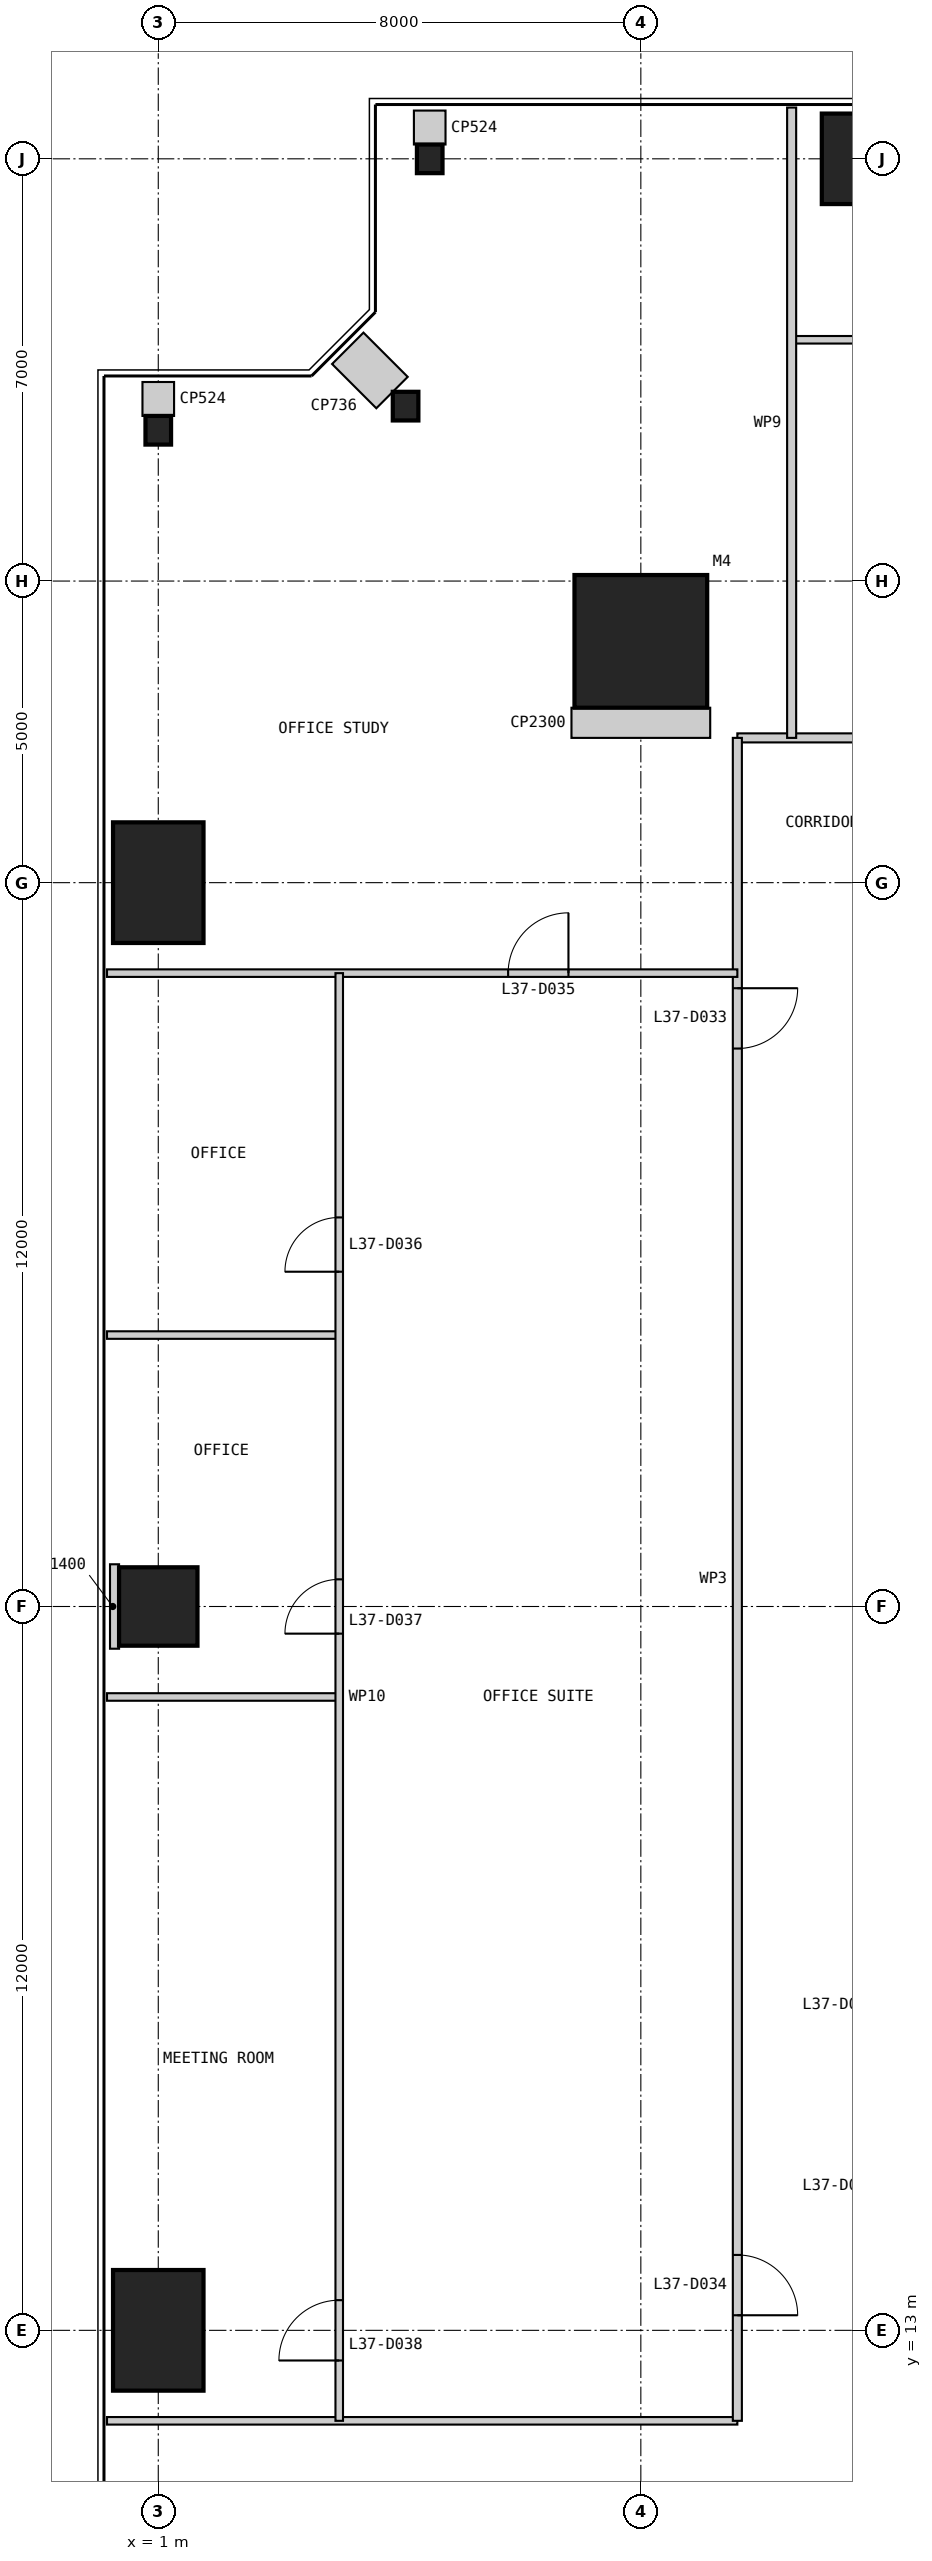
"""IFC4 building model, lengths in metres.
Left out: names, types, materials, properties, quantities, classifications, styles, units other than length and angle.
Written with IfcOpenShell. Run it as: python <this file> out.ifc"""

import sys

from ifc_helpers import new_model, si_unit, direction, frame, frame_2d, origin, origin_2d, place, context, subcontext, project, spatial, rectangle, i_section, extrude, element, fill, save


model = new_model("IFC4")
c1 = context("Model", 3, precision=1e-05, world=origin(), true_north=direction((0.0, 1.0)))
c2 = subcontext(c1, "Body", "Model", "MODEL_VIEW")
j1 = project(units=[si_unit("LENGTHUNIT", "METRE"), si_unit("PLANEANGLEUNIT", "RADIAN")], contexts=[c1])
p1 = place(None, origin())
s1 = spatial("IfcSite", under=j1, at=p1, CompositionType="ELEMENT")
p2 = place(p1, origin())
s2 = spatial("IfcBuilding", under=s1, at=p2, CompositionType="ELEMENT")
p3 = place(p2, frame((0.0, 0.0, 158.4)))
s3 = spatial("IfcBuildingStorey", under=s2, at=p3, CompositionType="ELEMENT", Elevation=158.4)
p4 = place(p3, frame((9.0, 41.0, 0.0), z_axis=(0.0, 0.0, 1.0), x_axis=(1.0, 0.0, 0.0)))
e1 = element("IfcColumn", 1, at=p4, inside=s3, PredefinedType="COLUMN", context=c2, shape_type="SweptSolid", body=[
    extrude(rectangle(XDim=2.2, YDim=2.2, at=origin_2d()), origin(), (0.0, 0.0, 1.0), 4.0),
])
p5 = place(p3, frame((13.0, 49.0, 0.0), z_axis=(0.0, 0.0, 1.0), x_axis=(1.0, 0.0, 0.0)))
e2 = element("IfcColumn", 2, at=p5, inside=s3, PredefinedType="COLUMN", context=c2, shape_type="SweptSolid", body=[
    extrude(rectangle(XDim=2.0, YDim=1.5, at=origin_2d()), origin(), (0.0, 0.0, 1.0), 4.0),
])
for number, where, z_axis, x_axis in (
    (3, (5.5, 49.0, 0.0), (0.0, 0.0, 1.0), (1.0, 0.0, 0.0)),
    (4, (5.1, 44.9, 0.0), (0.0, 0.0, 1.0), (1.0, 0.0, 0.0)),
    (5, (1.0, 44.5, 0.0), (0.0, 0.0, 1.0), (1.0, 0.0, 0.0)),
):
    element("IfcColumn", number, at=place(p3, frame(where, z_axis=z_axis, x_axis=x_axis)), inside=s3, PredefinedType="COLUMN", context=c2, shape_type="SweptSolid", body=[
        extrude(i_section(OverallWidth=0.424, OverallDepth=0.475, WebThickness=0.048, FlangeThickness=0.077, at=origin_2d()), origin(), (0.0, 0.0, 1.0), 4.0),
    ])
p6 = place(p3, frame((1.0, 37.0, 0.0), z_axis=(0.0, 0.0, 1.0), x_axis=(1.0, 0.0, 0.0)))
e6 = element("IfcColumn", 6, at=p6, inside=s3, PredefinedType="COLUMN", context=c2, shape_type="SweptSolid", body=[
    extrude(rectangle(XDim=1.5, YDim=2.0, at=origin_2d()), origin(), (0.0, 0.0, 1.0), 4.0),
])
p7 = place(p3, frame((1.0, 25.0, 0.0), z_axis=(0.0, 0.0, 1.0), x_axis=(1.0, 0.0, 0.0)))
e7 = element("IfcColumn", 7, at=p7, inside=s3, PredefinedType="COLUMN", context=c2, shape_type="SweptSolid", body=[
    extrude(rectangle(XDim=1.3, YDim=1.3, at=origin_2d()), origin(), (0.0, 0.0, 1.0), 4.0),
])
p8 = place(p3, frame((1.0, 13.0, 0.0), z_axis=(0.0, 0.0, 1.0), x_axis=(1.0, 0.0, 0.0)))
e8 = element("IfcColumn", 8, at=p8, inside=s3, PredefinedType="COLUMN", context=c2, shape_type="SweptSolid", body=[
    extrude(rectangle(XDim=1.5, YDim=2.0, at=origin_2d()), origin(), (0.0, 0.0, 1.0), 4.0),
])
p9 = place(p3, frame((0.15, 11.5, 0.0), z_axis=(0.0, 0.0, 1.0), x_axis=(1.0, 0.0, 0.0)))
e9 = element("IfcWall", 9, at=p9, inside=s3, PredefinedType="PARTITIONING", context=c2, shape_type="SweptSolid", body=[
    extrude(rectangle(XDim=10.45, YDim=0.125, at=frame_2d((5.225, 0.0))), origin(), (0.0, 0.0, 1.0), 3.8),
])
p10 = place(p3, frame((39.4, 39.4, 0.0), z_axis=(0.0, 0.0, 1.0), x_axis=(-1.0, 0.0, 0.0)))
e10 = element("IfcWall", 10, at=p10, inside=s3, PredefinedType="PARTITIONING", context=c2, shape_type="SweptSolid", body=[
    extrude(rectangle(XDim=28.8, YDim=0.15, at=frame_2d((14.4, 0.0))), origin(), (0.0, 0.0, 1.0), 3.8),
])
p11 = place(p10, frame((4.15, 0.0, 0.0)))
e11 = element("IfcOpeningElement", 11, at=p11, cuts=e10, PredefinedType="OPENING", context=c2, shape_type="SweptSolid", body=[
    extrude(rectangle(XDim=1.0, YDim=2.2, at=frame_2d((0.5, 1.1))), frame((0.0, 0.085, 0.0), z_axis=(0.0, -1.0, 0.0), x_axis=(1.0, 0.0, 0.0)), (0.0, 0.0, 1.0), 0.17),
])
p12 = place(p10, frame((23.65, 0.0, 0.0)))
e12 = element("IfcOpeningElement", 12, at=p12, cuts=e10, PredefinedType="OPENING", context=c2, shape_type="SweptSolid", body=[
    extrude(rectangle(XDim=1.0, YDim=2.2, at=frame_2d((0.5, 1.1))), frame((0.0, 0.085, 0.0), z_axis=(0.0, -1.0, 0.0), x_axis=(1.0, 0.0, 0.0)), (0.0, 0.0, 1.0), 0.17),
])
p13 = place(p10, frame((1.15, 0.0, 0.0)))
e13 = element("IfcOpeningElement", 13, at=p13, cuts=e10, PredefinedType="OPENING", context=c2, shape_type="SweptSolid", body=[
    extrude(rectangle(XDim=1.0, YDim=2.2, at=frame_2d((0.5, 1.1))), frame((0.0, 0.085, 0.0), z_axis=(0.0, -1.0, 0.0), x_axis=(1.0, 0.0, 0.0)), (0.0, 0.0, 1.0), 0.17),
])
p14 = place(p3, frame((17.5, 46.0, 0.0), z_axis=(0.0, 0.0, 1.0), x_axis=(-1.0, 0.0, 0.0)))
e14 = element("IfcWall", 14, at=p14, inside=s3, PredefinedType="PARTITIONING", context=c2, shape_type="SweptSolid", body=[
    extrude(rectangle(XDim=6.0, YDim=0.125, at=frame_2d((3.0, 0.0))), origin(), (0.0, 0.0, 1.0), 3.8),
])
p15 = place(p3, frame((10.6, 39.4, 0.0), z_axis=(0.0, 0.0, 1.0), x_axis=(0.0, -1.0, 0.0)))
e15 = element("IfcWall", 15, at=p15, inside=s3, PredefinedType="PARTITIONING", context=c2, shape_type="SweptSolid", body=[
    extrude(rectangle(XDim=27.9, YDim=0.15, at=frame_2d((13.95, 0.0))), origin(), (0.0, 0.0, 1.0), 3.8),
])
p16 = place(p15, frame((4.15, 0.0, 0.0)))
e16 = element("IfcOpeningElement", 16, at=p16, cuts=e15, PredefinedType="OPENING", context=c2, shape_type="SweptSolid", body=[
    extrude(rectangle(XDim=1.0, YDim=2.2, at=frame_2d((0.5, 1.1))), frame((0.0, 0.085, 0.0), z_axis=(0.0, -1.0, 0.0), x_axis=(1.0, 0.0, 0.0)), (0.0, 0.0, 1.0), 0.17),
])
p17 = place(p15, frame((25.15, 0.0, 0.0)))
e17 = element("IfcOpeningElement", 17, at=p17, cuts=e15, PredefinedType="OPENING", context=c2, shape_type="SweptSolid", body=[
    extrude(rectangle(XDim=1.0, YDim=2.2, at=frame_2d((0.5, 1.1))), frame((0.0, 0.085, 0.0), z_axis=(0.0, -1.0, 0.0), x_axis=(1.0, 0.0, 0.0)), (0.0, 0.0, 1.0), 0.17),
])
p18 = place(p3, frame((11.5, 49.85, 0.0), z_axis=(0.0, 0.0, 1.0), x_axis=(0.0, -1.0, 0.0)))
e18 = element("IfcWall", 18, at=p18, inside=s3, PredefinedType="PARTITIONING", context=c2, shape_type="SweptSolid", body=[
    extrude(rectangle(XDim=10.45, YDim=0.15, at=frame_2d((5.225, 0.0))), origin(), (0.0, 0.0, 1.0), 3.8),
])
p19 = place(p3, frame((0.15, 35.5, 0.0), z_axis=(0.0, 0.0, 1.0), x_axis=(1.0, 0.0, 0.0)))
e19 = element("IfcWall", 19, at=p19, inside=s3, PredefinedType="PARTITIONING", context=c2, shape_type="SweptSolid", body=[
    extrude(rectangle(XDim=10.45, YDim=0.125, at=frame_2d((5.225, 0.0))), origin(), (0.0, 0.0, 1.0), 3.8),
])
p20 = place(p19, frame((6.65, 0.0, 0.0)))
e20 = element("IfcOpeningElement", 20, at=p20, cuts=e19, PredefinedType="OPENING", context=c2, shape_type="SweptSolid", body=[
    extrude(rectangle(XDim=1.0, YDim=2.2, at=frame_2d((0.5, 1.1))), frame((0.0, 0.073, 0.0), z_axis=(0.0, -1.0, 0.0), x_axis=(1.0, 0.0, 0.0)), (0.0, 0.0, 1.0), 0.145),
])
for number, where, z_axis, x_axis in (
    (21, (0.15, 29.5, 0.0), (0.0, 0.0, 1.0), (1.0, 0.0, 0.0)),
    (22, (0.15, 23.5, 0.0), (0.0, 0.0, 1.0), (1.0, 0.0, 0.0)),
):
    element("IfcWall", number, at=place(p3, frame(where, z_axis=z_axis, x_axis=x_axis)), inside=s3, PredefinedType="PARTITIONING", context=c2, shape_type="SweptSolid", body=[
        extrude(rectangle(XDim=3.85, YDim=0.125, at=frame_2d((1.925, 0.0))), origin(), (0.0, 0.0, 1.0), 3.8),
    ])
p21 = place(p3, frame((4.0, 35.5, 0.0), z_axis=(0.0, 0.0, 1.0), x_axis=(0.0, -1.0, 0.0)))
e23 = element("IfcWall", 23, at=p21, inside=s3, PredefinedType="PARTITIONING", context=c2, shape_type="SweptSolid", body=[
    extrude(rectangle(XDim=24.0, YDim=0.125, at=frame_2d((12.0, 0.0))), origin(), (0.0, 0.0, 1.0), 2.954),
])
p22 = place(p21, frame((4.05, 0.0, 0.0)))
e24 = element("IfcOpeningElement", 24, at=p22, cuts=e23, PredefinedType="OPENING", context=c2, shape_type="SweptSolid", body=[
    extrude(rectangle(XDim=0.9, YDim=2.2, at=frame_2d((0.45, 1.1))), frame((0.0, 0.073, 0.0), z_axis=(0.0, -1.0, 0.0), x_axis=(1.0, 0.0, 0.0)), (0.0, 0.0, 1.0), 0.145),
])
p23 = place(p21, frame((10.05, 0.0, 0.0)))
e25 = element("IfcOpeningElement", 25, at=p23, cuts=e23, PredefinedType="OPENING", context=c2, shape_type="SweptSolid", body=[
    extrude(rectangle(XDim=0.9, YDim=2.2, at=frame_2d((0.45, 1.1))), frame((0.0, 0.073, 0.0), z_axis=(0.0, -1.0, 0.0), x_axis=(1.0, 0.0, 0.0)), (0.0, 0.0, 1.0), 0.145),
])
p24 = place(p21, frame((22.0, 0.0, 0.0)))
e26 = element("IfcOpeningElement", 26, at=p24, cuts=e23, PredefinedType="OPENING", context=c2, shape_type="SweptSolid", body=[
    extrude(rectangle(XDim=1.0, YDim=2.2, at=frame_2d((0.5, 1.1))), frame((0.0, 0.073, 0.0), z_axis=(0.0, -1.0, 0.0), x_axis=(1.0, 0.0, 0.0)), (0.0, 0.0, 1.0), 0.145),
])
p25 = place(p3, frame((9.0, 39.4, 0.0), z_axis=(0.0, 0.0, 1.0), x_axis=(0.0, 1.0, 0.0)))
e27 = element("IfcWall", 27, at=p25, inside=s3, PredefinedType="PARTITIONING", context=c2, shape_type="SweptSolid", body=[
    extrude(rectangle(XDim=0.5, YDim=2.3, at=frame_2d((0.25, 0.0))), origin(), (0.0, 0.0, 1.0), 3.8),
])
p26 = place(p3, frame((5.5, 49.8, 0.0), z_axis=(0.0, 0.0, 1.0), x_axis=(0.0, -1.0, 0.0)))
e28 = element("IfcWall", 28, at=p26, inside=s3, PredefinedType="PARTITIONING", context=c2, shape_type="SweptSolid", body=[
    extrude(rectangle(XDim=0.562, YDim=0.524, at=frame_2d((0.281, 0.0))), origin(), (0.0, 0.0, 1.0), 3.8),
])
p27 = place(p3, frame((4.141, 45.859, 0.0), z_axis=(0.0, 0.0, 1.0), x_axis=(0.707106781187, -0.707106781187, 0.0)))
e29 = element("IfcWall", 29, at=p27, inside=s3, PredefinedType="PARTITIONING", context=c2, shape_type="SweptSolid", body=[
    extrude(rectangle(XDim=1.038, YDim=0.736, at=frame_2d((0.519, 0.0))), origin(), (0.0, 0.0, 1.0), 3.8),
])
p28 = place(p3, frame((1.0, 45.3, 0.0), z_axis=(0.0, 0.0, 1.0), x_axis=(0.0, -1.0, 0.0)))
e30 = element("IfcWall", 30, at=p28, inside=s3, PredefinedType="PARTITIONING", context=c2, shape_type="SweptSolid", body=[
    extrude(rectangle(XDim=0.562, YDim=0.524, at=frame_2d((0.281, 0.0))), origin(), (0.0, 0.0, 1.0), 3.8),
])
p29 = place(p3, frame((0.2, 25.0, 0.0), z_axis=(0.0, 0.0, 1.0), x_axis=(1.0, 0.0, 0.0)))
e31 = element("IfcWall", 31, at=p29, inside=s3, PredefinedType="PARTITIONING", context=c2, shape_type="SweptSolid", body=[
    extrude(rectangle(XDim=0.15, YDim=1.4, at=frame_2d((0.075, 0.0))), origin(), (0.0, 0.0, 1.0), 3.8),
])
p30 = place(p16, origin())
e32 = element("IfcDoor", 32, at=p30, inside=s3, OperationType="SINGLE_SWING_LEFT", PredefinedType="DOOR", context=c2, shape_type="SweptSolid", body=[
    extrude(rectangle(XDim=1.0, YDim=2.2, at=frame_2d((0.5, 1.1))), frame((0.0, 0.025, 0.0), z_axis=(0.0, -1.0, 0.0), x_axis=(1.0, 0.0, 0.0)), (0.0, 0.0, 1.0), 0.05),
])
fill(e16, e32)
p31 = place(p17, origin())
e33 = element("IfcDoor", 33, at=p31, inside=s3, OperationType="SINGLE_SWING_RIGHT", PredefinedType="DOOR", context=c2, shape_type="SweptSolid", body=[
    extrude(rectangle(XDim=1.0, YDim=2.2, at=frame_2d((0.5, 1.1))), frame((0.0, 0.025, 0.0), z_axis=(0.0, -1.0, 0.0), x_axis=(1.0, 0.0, 0.0)), (0.0, 0.0, 1.0), 0.05),
])
fill(e17, e33)
p32 = place(p20, origin())
e34 = element("IfcDoor", 34, at=p32, inside=s3, OperationType="SINGLE_SWING_RIGHT", PredefinedType="DOOR", context=c2, shape_type="SweptSolid", body=[
    extrude(rectangle(XDim=1.0, YDim=2.2, at=frame_2d((0.5, 1.1))), frame((0.0, 0.025, 0.0), z_axis=(0.0, -1.0, 0.0), x_axis=(1.0, 0.0, 0.0)), (0.0, 0.0, 1.0), 0.05),
])
fill(e20, e34)
p33 = place(p22, frame((0.9, 0.0, 0.0), z_axis=(0.0, 0.0, 1.0), x_axis=(-1.0, 0.0, 0.0)))
e35 = element("IfcDoor", 35, at=p33, inside=s3, OperationType="SINGLE_SWING_LEFT", PredefinedType="DOOR", context=c2, shape_type="SweptSolid", body=[
    extrude(rectangle(XDim=0.9, YDim=2.2, at=frame_2d((0.45, 1.1))), frame((0.0, 0.025, 0.0), z_axis=(0.0, -1.0, 0.0), x_axis=(1.0, 0.0, 0.0)), (0.0, 0.0, 1.0), 0.05),
])
fill(e24, e35)
p34 = place(p23, frame((0.9, 0.0, 0.0), z_axis=(0.0, 0.0, 1.0), x_axis=(-1.0, 0.0, 0.0)))
e36 = element("IfcDoor", 36, at=p34, inside=s3, OperationType="SINGLE_SWING_LEFT", PredefinedType="DOOR", context=c2, shape_type="SweptSolid", body=[
    extrude(rectangle(XDim=0.9, YDim=2.2, at=frame_2d((0.45, 1.1))), frame((0.0, 0.025, 0.0), z_axis=(0.0, -1.0, 0.0), x_axis=(1.0, 0.0, 0.0)), (0.0, 0.0, 1.0), 0.05),
])
fill(e25, e36)
p35 = place(p24, frame((1.0, 0.0, 0.0), z_axis=(0.0, 0.0, 1.0), x_axis=(-1.0, 0.0, 0.0)))
e37 = element("IfcDoor", 37, at=p35, inside=s3, OperationType="SINGLE_SWING_LEFT", PredefinedType="DOOR", context=c2, shape_type="SweptSolid", body=[
    extrude(rectangle(XDim=1.0, YDim=2.2, at=frame_2d((0.5, 1.1))), frame((0.0, 0.025, 0.0), z_axis=(0.0, -1.0, 0.0), x_axis=(1.0, 0.0, 0.0)), (0.0, 0.0, 1.0), 0.05),
])
fill(e26, e37)
save(model, sys.argv[1])
